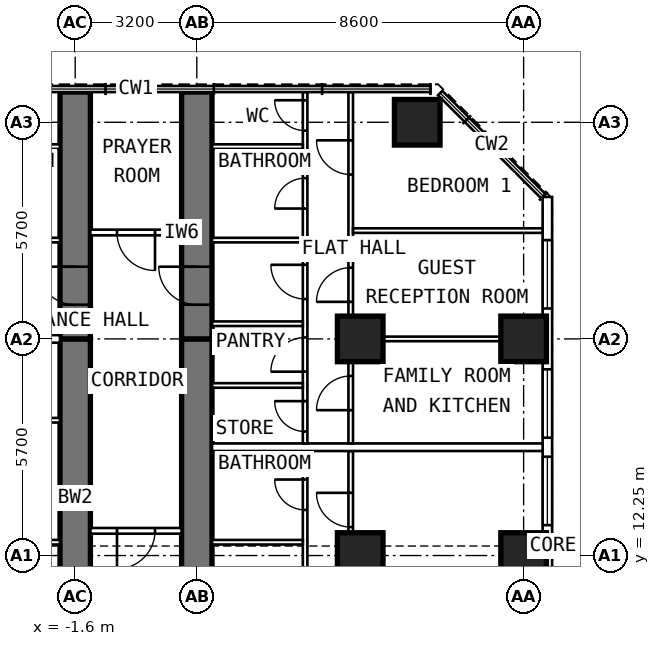
"""IFC4 building model, lengths in metres.
Left out: names, types, materials, properties, quantities, classifications, styles, units other than length and angle.
Written with IfcOpenShell. Run it as: python <this file> out.ifc"""

import sys

from ifc_helpers import new_model, si_unit, direction, frame, frame_2d, origin, origin_2d, place, context, subcontext, project, spatial, rectangle, extrude, element, fill, save


model = new_model("IFC4")
c1 = context("Model", 3, precision=1e-05, world=origin(), true_north=direction((0.0, 1.0)))
c2 = subcontext(c1, "Body", "Model", "MODEL_VIEW")
j1 = project(units=[si_unit("LENGTHUNIT", "METRE"), si_unit("PLANEANGLEUNIT", "RADIAN")], contexts=[c1])
p1 = place(None, origin())
s1 = spatial("IfcSite", under=j1, at=p1, CompositionType="ELEMENT")
p2 = place(p1, origin())
s2 = spatial("IfcBuilding", under=s1, at=p2, CompositionType="ELEMENT")
p3 = place(p2, frame((0.0, 0.0, 123.8)))
s3 = spatial("IfcBuildingStorey", under=s2, at=p3, CompositionType="ELEMENT", Elevation=123.8)
for number, where, z_axis, x_axis in (
    (1, (10.2, 12.25, 0.0), (0.0, 0.0, 1.0), (0.0, 1.0, 0.0)),
    (2, (10.2, 17.95, 0.0), (0.0, 0.0, 1.0), (0.0, 1.0, 0.0)),
    (3, (7.4, 23.65, 0.0), (0.0, 0.0, 1.0), (0.0, 1.0, 0.0)),
    (4, (5.9, 12.25, 0.0), (0.0, 0.0, 1.0), (0.0, 1.0, 0.0)),
    (5, (5.9, 17.95, 0.0), (0.0, 0.0, 1.0), (0.0, 1.0, 0.0)),
):
    element("IfcColumn", number, at=place(p3, frame(where, z_axis=z_axis, x_axis=x_axis)), inside=s3, PredefinedType="COLUMN", context=c2, shape_type="SweptSolid", body=[
        extrude(rectangle(XDim=1.2, YDim=1.2, at=origin_2d()), origin(), (0.0, 0.0, 1.0), 3.6),
    ])
p4 = place(p3, frame((-1.6, 9.6, 0.0), z_axis=(0.0, 0.0, 1.0), x_axis=(0.0, 1.0, 0.0)))
e6 = element("IfcWall", 6, at=p4, inside=s3, PredefinedType="SHEAR", context=c2, shape_type="SweptSolid", body=[
    extrude(rectangle(XDim=8.35, YDim=0.8, at=frame_2d((4.175, 0.0))), origin(), (0.0, 0.0, 1.0), 3.6),
])
p5 = place(p4, frame((1.3, 0.0, 0.0)))
e7 = element("IfcOpeningElement", 7, at=p5, cuts=e6, PredefinedType="OPENING", context=c2, shape_type="SweptSolid", body=[
    extrude(rectangle(XDim=1.0, YDim=2.1, at=frame_2d((0.5, 1.05))), frame((0.0, 0.412, 0.0), z_axis=(0.0, -1.0, 0.0), x_axis=(1.0, 0.0, 0.0)), (0.0, 0.0, 1.0), 0.824),
])
p6 = place(p3, frame((-1.6, 17.95, 0.0), z_axis=(0.0, 0.0, 1.0), x_axis=(0.0, 1.0, 0.0)))
e8 = element("IfcWall", 8, at=p6, inside=s3, PredefinedType="SHEAR", context=c2, shape_type="SweptSolid", body=[
    extrude(rectangle(XDim=6.495, YDim=0.8, at=frame_2d((3.248, 0.0))), origin(), (0.0, 0.0, 1.0), 3.6),
])
p7 = place(p6, frame((0.9, 0.0, 0.0)))
e9 = element("IfcOpeningElement", 9, at=p7, cuts=e8, PredefinedType="OPENING", context=c2, shape_type="SweptSolid", body=[
    extrude(rectangle(XDim=1.0, YDim=2.1, at=frame_2d((0.5, 1.05))), frame((0.0, 0.412, 0.0), z_axis=(0.0, -1.0, 0.0), x_axis=(1.0, 0.0, 0.0)), (0.0, 0.0, 1.0), 0.824),
])
p8 = place(p3, frame((1.6, 9.6, 0.0), z_axis=(0.0, 0.0, 1.0), x_axis=(0.0, 1.0, 0.0)))
e10 = element("IfcWall", 10, at=p8, inside=s3, PredefinedType="SHEAR", context=c2, shape_type="SweptSolid", body=[
    extrude(rectangle(XDim=8.35, YDim=0.8, at=frame_2d((4.175, 0.0))), origin(), (0.0, 0.0, 1.0), 3.6),
])
p9 = place(p8, frame((1.3, 0.0, 0.0)))
e11 = element("IfcOpeningElement", 11, at=p9, cuts=e10, PredefinedType="OPENING", context=c2, shape_type="SweptSolid", body=[
    extrude(rectangle(XDim=1.0, YDim=2.1, at=frame_2d((0.5, 1.05))), frame((0.0, 0.412, 0.0), z_axis=(0.0, -1.0, 0.0), x_axis=(1.0, 0.0, 0.0)), (0.0, 0.0, 1.0), 0.824),
])
p10 = place(p3, frame((1.6, 17.95, 0.0), z_axis=(0.0, 0.0, 1.0), x_axis=(0.0, 1.0, 0.0)))
e12 = element("IfcWall", 12, at=p10, inside=s3, PredefinedType="SHEAR", context=c2, shape_type="SweptSolid", body=[
    extrude(rectangle(XDim=6.495, YDim=0.8, at=frame_2d((3.248, 0.0))), origin(), (0.0, 0.0, 1.0), 3.6),
])
p11 = place(p10, frame((0.9, 0.0, 0.0)))
e13 = element("IfcOpeningElement", 13, at=p11, cuts=e12, PredefinedType="OPENING", context=c2, shape_type="SweptSolid", body=[
    extrude(rectangle(XDim=1.0, YDim=2.1, at=frame_2d((0.5, 1.05))), frame((0.0, 0.412, 0.0), z_axis=(0.0, -1.0, 0.0), x_axis=(1.0, 0.0, 0.0)), (0.0, 0.0, 1.0), 0.824),
])
p12 = place(p3, frame((10.825, 6.409, 0.0), z_axis=(0.0, 0.0, 1.0), x_axis=(0.0, 1.0, 0.0)))
e14 = element("IfcWall", 14, at=p12, inside=s3, PredefinedType="SOLIDWALL", context=c2, shape_type="SweptSolid", body=[
    extrude(rectangle(XDim=15.276, YDim=0.25, at=frame_2d((7.638, 0.0))), origin(), (0.0, 0.0, 1.0), 3.35),
])
p13 = place(p12, frame((0.941, 0.0, 0.8)))
e15 = element("IfcOpeningElement", 15, at=p13, cuts=e14, PredefinedType="OPENING", context=c2, shape_type="SweptSolid", body=[
    extrude(rectangle(XDim=1.8, YDim=1.8, at=frame_2d((0.9, 0.9))), frame((0.0, 0.137, 0.0), z_axis=(0.0, -1.0, 0.0), x_axis=(1.0, 0.0, 0.0)), (0.0, 0.0, 1.0), 0.274),
])
p14 = place(p12, frame((3.241, 0.0, 0.8)))
e16 = element("IfcOpeningElement", 16, at=p14, cuts=e14, PredefinedType="OPENING", context=c2, shape_type="SweptSolid", body=[
    extrude(rectangle(XDim=1.8, YDim=1.8, at=frame_2d((0.9, 0.9))), frame((0.0, 0.137, 0.0), z_axis=(0.0, -1.0, 0.0), x_axis=(1.0, 0.0, 0.0)), (0.0, 0.0, 1.0), 0.274),
])
p15 = place(p12, frame((6.641, 0.0, 0.8)))
e17 = element("IfcOpeningElement", 17, at=p15, cuts=e14, PredefinedType="OPENING", context=c2, shape_type="SweptSolid", body=[
    extrude(rectangle(XDim=1.8, YDim=1.8, at=frame_2d((0.9, 0.9))), frame((0.0, 0.137, 0.0), z_axis=(0.0, -1.0, 0.0), x_axis=(1.0, 0.0, 0.0)), (0.0, 0.0, 1.0), 0.274),
])
p16 = place(p12, frame((8.941, 0.0, 0.8)))
e18 = element("IfcOpeningElement", 18, at=p16, cuts=e14, PredefinedType="OPENING", context=c2, shape_type="SweptSolid", body=[
    extrude(rectangle(XDim=1.8, YDim=1.8, at=frame_2d((0.9, 0.9))), frame((0.0, 0.137, 0.0), z_axis=(0.0, -1.0, 0.0), x_axis=(1.0, 0.0, 0.0)), (0.0, 0.0, 1.0), 0.274),
])
p17 = place(p12, frame((12.341, 0.0, 0.8)))
e19 = element("IfcOpeningElement", 19, at=p17, cuts=e14, PredefinedType="OPENING", context=c2, shape_type="SweptSolid", body=[
    extrude(rectangle(XDim=1.8, YDim=1.8, at=frame_2d((0.9, 0.9))), frame((0.0, 0.137, 0.0), z_axis=(0.0, -1.0, 0.0), x_axis=(1.0, 0.0, 0.0)), (0.0, 0.0, 1.0), 0.274),
])
p18 = place(p3, frame((-2.0, 12.6, 0.0), z_axis=(0.0, 0.0, 1.0), x_axis=(-1.0, 0.0, 0.0)))
e20 = element("IfcWall", 20, at=p18, inside=s3, PredefinedType="PARTITIONING", context=c2, shape_type="SweptSolid", body=[
    extrude(rectangle(XDim=2.39, YDim=0.12, at=frame_2d((1.195, 0.0))), origin(), (0.0, 0.0, 1.0), 2.45),
])
for number, where, z_axis, x_axis in (
    (21, (-2.0, 15.81, 0.0), (0.0, 0.0, 1.0), (-1.0, 0.0, 0.0)),
    (22, (-2.0, 20.55, 0.0), (0.0, 0.0, 1.0), (-1.0, 0.0, 0.0)),
    (23, (-2.0, 23.01, 0.0), (0.0, 0.0, 1.0), (-1.0, 0.0, 0.0)),
):
    element("IfcWall", number, at=place(p3, frame(where, z_axis=z_axis, x_axis=x_axis)), inside=s3, PredefinedType="PARTITIONING", context=c2, shape_type="SweptSolid", body=[
        extrude(rectangle(XDim=2.39, YDim=0.12, at=frame_2d((1.195, 0.0))), origin(), (0.0, 0.0, 1.0), 3.35),
    ])
p19 = place(p3, frame((-2.0, 17.95, 0.0), z_axis=(0.0, 0.0, 1.0), x_axis=(-1.0, 0.0, 0.0)))
e24 = element("IfcWall", 24, at=p19, inside=s3, PredefinedType="PARTITIONING", context=c2, shape_type="SweptSolid", body=[
    extrude(rectangle(XDim=8.7, YDim=0.2, at=frame_2d((4.35, 0.0))), origin(), (0.0, 0.0, 1.0), 2.45),
])
p20 = place(p3, frame((4.45, 10.05, 0.0), z_axis=(0.0, 0.0, 1.0), x_axis=(0.0, 1.0, 0.0)))
e25 = element("IfcWall", 25, at=p20, inside=s3, PredefinedType="PARTITIONING", context=c2, shape_type="SweptSolid", body=[
    extrude(rectangle(XDim=4.95, YDim=0.12, at=frame_2d((2.475, 0.0))), origin(), (0.0, 0.0, 1.0), 3.35),
])
p21 = place(p20, frame((0.8, 0.0, 0.0)))
e26 = element("IfcOpeningElement", 26, at=p21, cuts=e25, PredefinedType="OPENING", context=c2, shape_type="SweptSolid", body=[
    extrude(rectangle(XDim=0.9, YDim=2.1, at=frame_2d((0.45, 1.05))), frame((0.0, 0.072, 0.0), z_axis=(0.0, -1.0, 0.0), x_axis=(1.0, 0.0, 0.0)), (0.0, 0.0, 1.0), 0.144),
])
p22 = place(p20, frame((3.4, 0.0, 0.0)))
e27 = element("IfcOpeningElement", 27, at=p22, cuts=e25, PredefinedType="OPENING", context=c2, shape_type="SweptSolid", body=[
    extrude(rectangle(XDim=0.8, YDim=2.1, at=frame_2d((0.4, 1.05))), frame((0.0, 0.072, 0.0), z_axis=(0.0, -1.0, 0.0), x_axis=(1.0, 0.0, 0.0)), (0.0, 0.0, 1.0), 0.144),
])
p23 = place(p3, frame((5.65, 9.6, 0.0), z_axis=(0.0, 0.0, 1.0), x_axis=(0.0, 1.0, 0.0)))
e28 = element("IfcWall", 28, at=p23, inside=s3, PredefinedType="PARTITIONING", context=c2, shape_type="SweptSolid", body=[
    extrude(rectangle(XDim=5.4, YDim=0.12, at=frame_2d((2.7, 0.0))), origin(), (0.0, 0.0, 1.0), 3.35),
])
p24 = place(p23, frame((3.4, 0.0, 0.0)))
e29 = element("IfcOpeningElement", 29, at=p24, cuts=e28, PredefinedType="OPENING", context=c2, shape_type="SweptSolid", body=[
    extrude(rectangle(XDim=0.9, YDim=2.1, at=frame_2d((0.45, 1.05))), frame((0.0, 0.072, 0.0), z_axis=(0.0, -1.0, 0.0), x_axis=(1.0, 0.0, 0.0)), (0.0, 0.0, 1.0), 0.144),
])
p25 = place(p3, frame((2.0, 12.6, 0.0), z_axis=(0.0, 0.0, 1.0), x_axis=(1.0, 0.0, 0.0)))
e30 = element("IfcWall", 30, at=p25, inside=s3, PredefinedType="PARTITIONING", context=c2, shape_type="SweptSolid", body=[
    extrude(rectangle(XDim=2.39, YDim=0.12, at=frame_2d((1.195, 0.0))), origin(), (0.0, 0.0, 1.0), 2.45),
])
p26 = place(p3, frame((4.45, 15.2, 0.0), z_axis=(0.0, 0.0, 1.0), x_axis=(0.0, 1.0, 0.0)))
e31 = element("IfcWall", 31, at=p26, inside=s3, PredefinedType="PARTITIONING", context=c2, shape_type="SweptSolid", body=[
    extrude(rectangle(XDim=9.245, YDim=0.12, at=frame_2d((4.623, 0.0))), origin(), (0.0, 0.0, 1.0), 3.35),
])
p27 = place(p26, frame((0.312, 0.0, 0.0)))
e32 = element("IfcOpeningElement", 32, at=p27, cuts=e31, PredefinedType="OPENING", context=c2, shape_type="SweptSolid", body=[
    extrude(rectangle(XDim=0.8, YDim=2.1, at=frame_2d((0.4, 1.05))), frame((0.0, 0.072, 0.0), z_axis=(0.0, -1.0, 0.0), x_axis=(1.0, 0.0, 0.0)), (0.0, 0.0, 1.0), 0.144),
])
p28 = place(p26, frame((1.887, 0.0, 0.0)))
e33 = element("IfcOpeningElement", 33, at=p28, cuts=e31, PredefinedType="OPENING", context=c2, shape_type="SweptSolid", body=[
    extrude(rectangle(XDim=0.9, YDim=2.1, at=frame_2d((0.45, 1.05))), frame((0.0, 0.072, 0.0), z_axis=(0.0, -1.0, 0.0), x_axis=(1.0, 0.0, 0.0)), (0.0, 0.0, 1.0), 0.144),
])
p29 = place(p26, frame((3.8, 0.0, 0.0)))
e34 = element("IfcOpeningElement", 34, at=p29, cuts=e31, PredefinedType="OPENING", context=c2, shape_type="SweptSolid", body=[
    extrude(rectangle(XDim=0.9, YDim=2.1, at=frame_2d((0.45, 1.05))), frame((0.0, 0.072, 0.0), z_axis=(0.0, -1.0, 0.0), x_axis=(1.0, 0.0, 0.0)), (0.0, 0.0, 1.0), 0.144),
])
p30 = place(p26, frame((6.18, 0.0, 0.0)))
e35 = element("IfcOpeningElement", 35, at=p30, cuts=e31, PredefinedType="OPENING", context=c2, shape_type="SweptSolid", body=[
    extrude(rectangle(XDim=0.8, YDim=2.1, at=frame_2d((0.4, 1.05))), frame((0.0, 0.072, 0.0), z_axis=(0.0, -1.0, 0.0), x_axis=(1.0, 0.0, 0.0)), (0.0, 0.0, 1.0), 0.144),
])
p31 = place(p26, frame((8.23, 0.0, 0.0)))
e36 = element("IfcOpeningElement", 36, at=p31, cuts=e31, PredefinedType="OPENING", context=c2, shape_type="SweptSolid", body=[
    extrude(rectangle(XDim=0.8, YDim=2.1, at=frame_2d((0.4, 1.05))), frame((0.0, 0.072, 0.0), z_axis=(0.0, -1.0, 0.0), x_axis=(1.0, 0.0, 0.0)), (0.0, 0.0, 1.0), 0.144),
])
p32 = place(p3, frame((5.65, 15.2, 0.0), z_axis=(0.0, 0.0, 1.0), x_axis=(0.0, 1.0, 0.0)))
e37 = element("IfcWall", 37, at=p32, inside=s3, PredefinedType="PARTITIONING", context=c2, shape_type="SweptSolid", body=[
    extrude(rectangle(XDim=9.245, YDim=0.12, at=frame_2d((4.623, 0.0))), origin(), (0.0, 0.0, 1.0), 3.35),
])
p33 = place(p32, frame((0.875, 0.0, 0.0)))
e38 = element("IfcOpeningElement", 38, at=p33, cuts=e37, PredefinedType="OPENING", context=c2, shape_type="SweptSolid", body=[
    extrude(rectangle(XDim=0.9, YDim=2.1, at=frame_2d((0.45, 1.05))), frame((0.0, 0.072, 0.0), z_axis=(0.0, -1.0, 0.0), x_axis=(1.0, 0.0, 0.0)), (0.0, 0.0, 1.0), 0.144),
])
p34 = place(p32, frame((3.725, 0.0, 0.0)))
e39 = element("IfcOpeningElement", 39, at=p34, cuts=e37, PredefinedType="OPENING", context=c2, shape_type="SweptSolid", body=[
    extrude(rectangle(XDim=0.9, YDim=2.1, at=frame_2d((0.45, 1.05))), frame((0.0, 0.072, 0.0), z_axis=(0.0, -1.0, 0.0), x_axis=(1.0, 0.0, 0.0)), (0.0, 0.0, 1.0), 0.144),
])
p35 = place(p32, frame((7.075, 0.0, 0.0)))
e40 = element("IfcOpeningElement", 40, at=p35, cuts=e37, PredefinedType="OPENING", context=c2, shape_type="SweptSolid", body=[
    extrude(rectangle(XDim=0.9, YDim=2.1, at=frame_2d((0.45, 1.05))), frame((0.0, 0.072, 0.0), z_axis=(0.0, -1.0, 0.0), x_axis=(1.0, 0.0, 0.0)), (0.0, 0.0, 1.0), 0.144),
])
p36 = place(p3, frame((5.71, 17.95, 0.0), z_axis=(0.0, 0.0, 1.0), x_axis=(1.0, 0.0, 0.0)))
e41 = element("IfcWall", 41, at=p36, inside=s3, PredefinedType="PARTITIONING", context=c2, shape_type="SweptSolid", body=[
    extrude(rectangle(XDim=4.99, YDim=0.12, at=frame_2d((2.495, 0.0))), origin(), (0.0, 0.0, 1.0), 2.45),
])
p37 = place(p3, frame((5.71, 20.8, 0.0), z_axis=(0.0, 0.0, 1.0), x_axis=(1.0, 0.0, 0.0)))
e42 = element("IfcWall", 42, at=p37, inside=s3, PredefinedType="PARTITIONING", context=c2, shape_type="SweptSolid", body=[
    extrude(rectangle(XDim=4.99, YDim=0.12, at=frame_2d((2.495, 0.0))), origin(), (0.0, 0.0, 1.0), 3.35),
])
for number, where, z_axis, x_axis in (
    (43, (2.0, 16.725, 0.0), (0.0, 0.0, 1.0), (1.0, 0.0, 0.0)),
    (44, (2.0, 18.35, 0.0), (0.0, 0.0, 1.0), (1.0, 0.0, 0.0)),
    (45, (2.0, 20.55, 0.0), (0.0, 0.0, 1.0), (1.0, 0.0, 0.0)),
    (46, (2.0, 23.01, 0.0), (0.0, 0.0, 1.0), (1.0, 0.0, 0.0)),
):
    element("IfcWall", number, at=place(p3, frame(where, z_axis=z_axis, x_axis=x_axis)), inside=s3, PredefinedType="PARTITIONING", context=c2, shape_type="SweptSolid", body=[
        extrude(rectangle(XDim=2.39, YDim=0.12, at=frame_2d((1.195, 0.0))), origin(), (0.0, 0.0, 1.0), 3.35),
    ])
p38 = place(p3, frame((2.0, 15.1, 0.0), z_axis=(0.0, 0.0, 1.0), x_axis=(1.0, 0.0, 0.0)))
e47 = element("IfcWall", 47, at=p38, inside=s3, PredefinedType="PARTITIONING", context=c2, shape_type="SweptSolid", body=[
    extrude(rectangle(XDim=8.7, YDim=0.2, at=frame_2d((4.35, 0.0))), origin(), (0.0, 0.0, 1.0), 3.35),
])
p39 = place(p3, frame((1.2, 20.75, 0.0), z_axis=(0.0, 0.0, 1.0), x_axis=(-1.0, 0.0, 0.0)))
e48 = element("IfcWall", 48, at=p39, inside=s3, PredefinedType="PARTITIONING", context=c2, shape_type="SweptSolid", body=[
    extrude(rectangle(XDim=2.4, YDim=0.15, at=frame_2d((1.2, 0.0))), origin(), (0.0, 0.0, 1.0), 3.35),
])
p40 = place(p39, frame((0.7, 0.0, 0.0)))
e49 = element("IfcOpeningElement", 49, at=p40, cuts=e48, PredefinedType="OPENING", context=c2, shape_type="SweptSolid", body=[
    extrude(rectangle(XDim=1.0, YDim=2.1, at=frame_2d((0.5, 1.05))), frame((0.0, 0.087, 0.0), z_axis=(0.0, -1.0, 0.0), x_axis=(1.0, 0.0, 0.0)), (0.0, 0.0, 1.0), 0.174),
])
p41 = place(p3, frame((1.2, 12.9, 0.0), z_axis=(0.0, 0.0, 1.0), x_axis=(-1.0, 0.0, 0.0)))
e50 = element("IfcWall", 50, at=p41, inside=s3, PredefinedType="PARTITIONING", context=c2, shape_type="SweptSolid", body=[
    extrude(rectangle(XDim=2.4, YDim=0.15, at=frame_2d((1.2, 0.0))), origin(), (0.0, 0.0, 1.0), 3.35),
])
p42 = place(p41, frame((0.7, 0.0, 0.0)))
e51 = element("IfcOpeningElement", 51, at=p42, cuts=e50, PredefinedType="OPENING", context=c2, shape_type="SweptSolid", body=[
    extrude(rectangle(XDim=1.0, YDim=2.1, at=frame_2d((0.5, 1.05))), frame((0.0, 0.087, 0.0), z_axis=(0.0, -1.0, 0.0), x_axis=(1.0, 0.0, 0.0)), (0.0, 0.0, 1.0), 0.174),
])
p43 = place(p15, origin())
e52 = element("IfcWindow", 52, at=p43, inside=s3, PartitioningType="SINGLE_PANEL", PredefinedType="WINDOW", context=c2, shape_type="SweptSolid", body=[
    extrude(rectangle(XDim=1.8, YDim=1.8, at=frame_2d((0.9, 0.9))), frame((0.0, 0.03, 0.0), z_axis=(0.0, -1.0, 0.0), x_axis=(1.0, 0.0, 0.0)), (0.0, 0.0, 1.0), 0.06),
])
fill(e17, e52)
p44 = place(p16, origin())
e53 = element("IfcWindow", 53, at=p44, inside=s3, PartitioningType="SINGLE_PANEL", PredefinedType="WINDOW", context=c2, shape_type="SweptSolid", body=[
    extrude(rectangle(XDim=1.8, YDim=1.8, at=frame_2d((0.9, 0.9))), frame((0.0, 0.03, 0.0), z_axis=(0.0, -1.0, 0.0), x_axis=(1.0, 0.0, 0.0)), (0.0, 0.0, 1.0), 0.06),
])
fill(e18, e53)
p45 = place(p17, origin())
e54 = element("IfcWindow", 54, at=p45, inside=s3, PartitioningType="SINGLE_PANEL", PredefinedType="WINDOW", context=c2, shape_type="SweptSolid", body=[
    extrude(rectangle(XDim=1.8, YDim=1.8, at=frame_2d((0.9, 0.9))), frame((0.0, 0.03, 0.0), z_axis=(0.0, -1.0, 0.0), x_axis=(1.0, 0.0, 0.0)), (0.0, 0.0, 1.0), 0.06),
])
fill(e19, e54)
p46 = place(p7, origin())
e55 = element("IfcDoor", 55, at=p46, inside=s3, OperationType="SINGLE_SWING_RIGHT", PredefinedType="DOOR", context=c2, shape_type="SweptSolid", body=[
    extrude(rectangle(XDim=1.0, YDim=2.1, at=frame_2d((0.5, 1.05))), frame((0.0, 0.15, 0.0), z_axis=(0.0, -1.0, 0.0), x_axis=(1.0, 0.0, 0.0)), (0.0, 0.0, 1.0), 0.3),
])
fill(e9, e55)
p47 = place(p24, origin())
e56 = element("IfcDoor", 56, at=p47, inside=s3, OperationType="SINGLE_SWING_RIGHT", PredefinedType="DOOR", context=c2, shape_type="SweptSolid", body=[
    extrude(rectangle(XDim=0.9, YDim=2.1, at=frame_2d((0.45, 1.05))), frame((0.0, 0.025, 0.0), z_axis=(0.0, -1.0, 0.0), x_axis=(1.0, 0.0, 0.0)), (0.0, 0.0, 1.0), 0.05),
])
fill(e29, e56)
p48 = place(p22, origin())
e57 = element("IfcDoor", 57, at=p48, inside=s3, OperationType="SINGLE_SWING_RIGHT", PredefinedType="DOOR", context=c2, shape_type="SweptSolid", body=[
    extrude(rectangle(XDim=0.8, YDim=2.1, at=frame_2d((0.4, 1.05))), frame((0.0, 0.025, 0.0), z_axis=(0.0, -1.0, 0.0), x_axis=(1.0, 0.0, 0.0)), (0.0, 0.0, 1.0), 0.05),
])
fill(e27, e57)
p49 = place(p11, origin())
e58 = element("IfcDoor", 58, at=p49, inside=s3, OperationType="SINGLE_SWING_RIGHT", PredefinedType="DOOR", context=c2, shape_type="SweptSolid", body=[
    extrude(rectangle(XDim=1.0, YDim=2.1, at=frame_2d((0.5, 1.05))), frame((0.0, 0.15, 0.0), z_axis=(0.0, -1.0, 0.0), x_axis=(1.0, 0.0, 0.0)), (0.0, 0.0, 1.0), 0.3),
])
fill(e13, e58)
p50 = place(p33, origin())
e59 = element("IfcDoor", 59, at=p50, inside=s3, OperationType="SINGLE_SWING_LEFT", PredefinedType="DOOR", context=c2, shape_type="SweptSolid", body=[
    extrude(rectangle(XDim=0.9, YDim=2.1, at=frame_2d((0.45, 1.05))), frame((0.0, 0.025, 0.0), z_axis=(0.0, -1.0, 0.0), x_axis=(1.0, 0.0, 0.0)), (0.0, 0.0, 1.0), 0.05),
])
fill(e38, e59)
p51 = place(p34, origin())
e60 = element("IfcDoor", 60, at=p51, inside=s3, OperationType="SINGLE_SWING_LEFT", PredefinedType="DOOR", context=c2, shape_type="SweptSolid", body=[
    extrude(rectangle(XDim=0.9, YDim=2.1, at=frame_2d((0.45, 1.05))), frame((0.0, 0.025, 0.0), z_axis=(0.0, -1.0, 0.0), x_axis=(1.0, 0.0, 0.0)), (0.0, 0.0, 1.0), 0.05),
])
fill(e39, e60)
p52 = place(p35, origin())
e61 = element("IfcDoor", 61, at=p52, inside=s3, OperationType="SINGLE_SWING_RIGHT", PredefinedType="DOOR", context=c2, shape_type="SweptSolid", body=[
    extrude(rectangle(XDim=0.9, YDim=2.1, at=frame_2d((0.45, 1.05))), frame((0.0, 0.025, 0.0), z_axis=(0.0, -1.0, 0.0), x_axis=(1.0, 0.0, 0.0)), (0.0, 0.0, 1.0), 0.05),
])
fill(e40, e61)
p53 = place(p27, origin())
e62 = element("IfcDoor", 62, at=p53, inside=s3, OperationType="SINGLE_SWING_RIGHT", PredefinedType="DOOR", context=c2, shape_type="SweptSolid", body=[
    extrude(rectangle(XDim=0.8, YDim=2.1, at=frame_2d((0.4, 1.05))), frame((0.0, 0.025, 0.0), z_axis=(0.0, -1.0, 0.0), x_axis=(1.0, 0.0, 0.0)), (0.0, 0.0, 1.0), 0.05),
])
fill(e32, e62)
p54 = place(p28, origin())
e63 = element("IfcDoor", 63, at=p54, inside=s3, OperationType="SINGLE_SWING_LEFT", PredefinedType="DOOR", context=c2, shape_type="SweptSolid", body=[
    extrude(rectangle(XDim=0.9, YDim=2.1, at=frame_2d((0.45, 1.05))), frame((0.0, 0.025, 0.0), z_axis=(0.0, -1.0, 0.0), x_axis=(1.0, 0.0, 0.0)), (0.0, 0.0, 1.0), 0.05),
])
fill(e33, e63)
p55 = place(p29, origin())
e64 = element("IfcDoor", 64, at=p55, inside=s3, OperationType="SINGLE_SWING_RIGHT", PredefinedType="DOOR", context=c2, shape_type="SweptSolid", body=[
    extrude(rectangle(XDim=0.9, YDim=2.1, at=frame_2d((0.45, 1.05))), frame((0.0, 0.025, 0.0), z_axis=(0.0, -1.0, 0.0), x_axis=(1.0, 0.0, 0.0)), (0.0, 0.0, 1.0), 0.05),
])
fill(e34, e64)
p56 = place(p30, origin())
e65 = element("IfcDoor", 65, at=p56, inside=s3, OperationType="SINGLE_SWING_LEFT", PredefinedType="DOOR", context=c2, shape_type="SweptSolid", body=[
    extrude(rectangle(XDim=0.8, YDim=2.1, at=frame_2d((0.4, 1.05))), frame((0.0, 0.025, 0.0), z_axis=(0.0, -1.0, 0.0), x_axis=(1.0, 0.0, 0.0)), (0.0, 0.0, 1.0), 0.05),
])
fill(e35, e65)
p57 = place(p31, origin())
e66 = element("IfcDoor", 66, at=p57, inside=s3, OperationType="SINGLE_SWING_RIGHT", PredefinedType="DOOR", context=c2, shape_type="SweptSolid", body=[
    extrude(rectangle(XDim=0.8, YDim=2.1, at=frame_2d((0.4, 1.05))), frame((0.0, 0.025, 0.0), z_axis=(0.0, -1.0, 0.0), x_axis=(1.0, 0.0, 0.0)), (0.0, 0.0, 1.0), 0.05),
])
fill(e36, e66)
p58 = place(p40, origin())
e67 = element("IfcDoor", 67, at=p58, inside=s3, OperationType="SINGLE_SWING_LEFT", PredefinedType="DOOR", context=c2, shape_type="SweptSolid", body=[
    extrude(rectangle(XDim=1.0, YDim=2.1, at=frame_2d((0.5, 1.05))), frame((0.0, 0.025, 0.0), z_axis=(0.0, -1.0, 0.0), x_axis=(1.0, 0.0, 0.0)), (0.0, 0.0, 1.0), 0.05),
])
fill(e49, e67)
p59 = place(p42, origin())
e68 = element("IfcDoor", 68, at=p59, inside=s3, OperationType="SINGLE_SWING_RIGHT", PredefinedType="DOOR", context=c2, shape_type="SweptSolid", body=[
    extrude(rectangle(XDim=1.0, YDim=2.1, at=frame_2d((0.5, 1.05))), frame((0.0, 0.025, 0.0), z_axis=(0.0, -1.0, 0.0), x_axis=(1.0, 0.0, 0.0)), (0.0, 0.0, 1.0), 0.05),
])
fill(e51, e68)
save(model, sys.argv[1])
